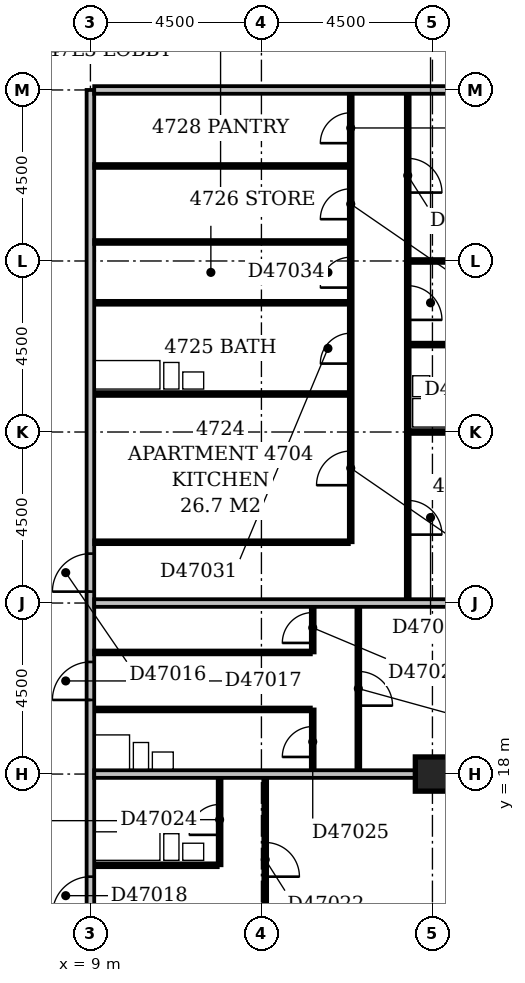
"""IFC4 building model, lengths in metres.
Left out: names, types, materials, properties, quantities, classifications, styles, units other than length and angle.
Written with IfcOpenShell. Run it as: python <this file> out.ifc"""

import sys

from ifc_helpers import new_model, si_unit, direction, frame, frame_2d, origin, origin_2d, place, context, subcontext, project, spatial, rectangle, extrude, element, fill, save


model = new_model("IFC4")
c1 = context("Model", 3, precision=1e-05, world=origin(), true_north=direction((0.0, 1.0)))
c2 = subcontext(c1, "Body", "Model", "MODEL_VIEW")
j1 = project(units=[si_unit("LENGTHUNIT", "METRE"), si_unit("PLANEANGLEUNIT", "RADIAN")], contexts=[c1])
p1 = place(None, origin())
s1 = spatial("IfcSite", under=j1, at=p1, CompositionType="ELEMENT")
p2 = place(p1, origin())
s2 = spatial("IfcBuilding", under=s1, at=p2, CompositionType="ELEMENT")
p3 = place(p2, frame((0.0, 0.0, 186.2)))
s3 = spatial("IfcBuildingStorey", under=s2, at=p3, CompositionType="ELEMENT", Elevation=186.2)
p4 = place(p3, frame((18.0, 18.0, -0.35), z_axis=(0.0, 0.0, 1.0), x_axis=(1.0, 0.0, 0.0)))
e1 = element("IfcColumn", 1, at=p4, inside=s3, PredefinedType="COLUMN", context=c2, shape_type="SweptSolid", body=[
    extrude(rectangle(XDim=0.9, YDim=0.9, at=origin_2d()), origin(), (0.0, 0.0, 1.0), 3.65),
])
p5 = place(p3, frame((9.0, 5.0, 0.0), z_axis=(0.0, 0.0, 1.0), x_axis=(0.0, 1.0, 0.0)))
e2 = element("IfcWall", 2, at=p5, inside=s3, PredefinedType="PARTITIONING", context=c2, shape_type="SweptSolid", body=[
    extrude(rectangle(XDim=31.0, YDim=0.2, at=frame_2d((15.5, 0.0))), origin(), (0.0, 0.0, 1.0), 3.3),
])
p6 = place(p5, frame((17.8, 0.0, 0.0)))
e3 = element("IfcOpeningElement", 3, at=p6, cuts=e2, PredefinedType="OPENING", context=c2, shape_type="SweptSolid", body=[
    extrude(rectangle(XDim=1.0, YDim=2.1, at=frame_2d((0.5, 1.05))), frame((0.0, 0.112, 0.0), z_axis=(0.0, -1.0, 0.0), x_axis=(1.0, 0.0, 0.0)), (0.0, 0.0, 1.0), 0.224),
])
p7 = place(p5, frame((14.95, 0.0, 0.0)))
e4 = element("IfcOpeningElement", 4, at=p7, cuts=e2, PredefinedType="OPENING", context=c2, shape_type="SweptSolid", body=[
    extrude(rectangle(XDim=1.0, YDim=2.1, at=frame_2d((0.5, 1.05))), frame((0.0, 0.112, 0.0), z_axis=(0.0, -1.0, 0.0), x_axis=(1.0, 0.0, 0.0)), (0.0, 0.0, 1.0), 0.224),
])
p8 = place(p5, frame((9.3, 0.0, 0.0)))
e5 = element("IfcOpeningElement", 5, at=p8, cuts=e2, PredefinedType="OPENING", context=c2, shape_type="SweptSolid", body=[
    extrude(rectangle(XDim=1.0, YDim=2.1, at=frame_2d((0.5, 1.05))), frame((0.0, 0.112, 0.0), z_axis=(0.0, -1.0, 0.0), x_axis=(1.0, 0.0, 0.0)), (0.0, 0.0, 1.0), 0.224),
])
p9 = place(p5, frame((1.5, 0.0, 0.0)))
e6 = element("IfcOpeningElement", 6, at=p9, cuts=e2, PredefinedType="OPENING", context=c2, shape_type="SweptSolid", body=[
    extrude(rectangle(XDim=0.9, YDim=2.1, at=frame_2d((0.45, 1.05))), frame((0.0, 0.112, 0.0), z_axis=(0.0, -1.0, 0.0), x_axis=(1.0, 0.0, 0.0)), (0.0, 0.0, 1.0), 0.224),
])
p10 = place(p3, frame((13.6, 9.45, 0.0), z_axis=(0.0, 0.0, 1.0), x_axis=(0.0, 1.0, 0.0)))
e7 = element("IfcWall", 7, at=p10, inside=s3, PredefinedType="PARTITIONING", context=c2, shape_type="SweptSolid", body=[
    extrude(rectangle(XDim=8.45, YDim=0.1, at=frame_2d((4.225, 0.0))), origin(), (0.0, 0.0, 1.0), 3.3),
])
p11 = place(p10, frame((1.35, 0.0, 0.0)))
e8 = element("IfcOpeningElement", 8, at=p11, cuts=e7, PredefinedType="OPENING", context=c2, shape_type="SweptSolid", body=[
    extrude(rectangle(XDim=0.9, YDim=2.1, at=frame_2d((0.45, 1.05))), frame((0.0, 0.062, 0.0), z_axis=(0.0, -1.0, 0.0), x_axis=(1.0, 0.0, 0.0)), (0.0, 0.0, 1.0), 0.124),
])
p12 = place(p10, frame((5.85, 0.0, 0.0)))
e9 = element("IfcOpeningElement", 9, at=p12, cuts=e7, PredefinedType="OPENING", context=c2, shape_type="SweptSolid", body=[
    extrude(rectangle(XDim=0.9, YDim=2.1, at=frame_2d((0.45, 1.05))), frame((0.0, 0.062, 0.0), z_axis=(0.0, -1.0, 0.0), x_axis=(1.0, 0.0, 0.0)), (0.0, 0.0, 1.0), 0.124),
])
p13 = place(p3, frame((9.1, 15.6, 0.0), z_axis=(0.0, 0.0, 1.0), x_axis=(1.0, 0.0, 0.0)))
e10 = element("IfcWall", 10, at=p13, inside=s3, PredefinedType="PLUMBINGWALL", context=c2, shape_type="SweptSolid", body=[
    extrude(rectangle(XDim=3.25, YDim=0.1, at=frame_2d((1.625, 0.0))), origin(), (0.0, 0.0, 1.0), 3.3),
])
p14 = place(p3, frame((12.4, 15.6, 0.0), z_axis=(0.0, 0.0, 1.0), x_axis=(0.0, 1.0, 0.0)))
e11 = element("IfcWall", 11, at=p14, inside=s3, PredefinedType="PARTITIONING", context=c2, shape_type="SweptSolid", body=[
    extrude(rectangle(XDim=2.3, YDim=0.1, at=frame_2d((1.15, 0.0))), origin(), (0.0, 0.0, 1.0), 3.3),
])
p15 = place(p14, frame((0.8, 0.0, 0.0)))
e12 = element("IfcOpeningElement", 12, at=p15, cuts=e11, PredefinedType="OPENING", context=c2, shape_type="SweptSolid", body=[
    extrude(rectangle(XDim=0.8, YDim=2.1, at=frame_2d((0.4, 1.05))), frame((0.0, 0.062, 0.0), z_axis=(0.0, -1.0, 0.0), x_axis=(1.0, 0.0, 0.0)), (0.0, 0.0, 1.0), 0.124),
])
p16 = place(p3, frame((9.1, 18.0, 0.0), z_axis=(0.0, 0.0, 1.0), x_axis=(1.0, 0.0, 0.0)))
e13 = element("IfcWall", 13, at=p16, inside=s3, PredefinedType="PARTITIONING", context=c2, shape_type="SweptSolid", body=[
    extrude(rectangle(XDim=8.45, YDim=0.2, at=frame_2d((4.225, 0.0))), origin(), (0.0, 0.0, 1.0), 2.6),
])
p17 = place(p3, frame((14.85, 18.1, 0.0), z_axis=(0.0, 0.0, 1.0), x_axis=(0.0, 1.0, 0.0)))
e14 = element("IfcWall", 14, at=p17, inside=s3, PredefinedType="PARTITIONING", context=c2, shape_type="SweptSolid", body=[
    extrude(rectangle(XDim=1.6, YDim=0.1, at=frame_2d((0.8, 0.0))), origin(), (0.0, 0.0, 1.0), 3.3),
])
p18 = place(p17, frame((0.35, 0.0, 0.0)))
e15 = element("IfcOpeningElement", 15, at=p18, cuts=e14, PredefinedType="OPENING", context=c2, shape_type="SweptSolid", body=[
    extrude(rectangle(XDim=0.8, YDim=2.1, at=frame_2d((0.4, 1.05))), frame((0.0, 0.062, 0.0), z_axis=(0.0, -1.0, 0.0), x_axis=(1.0, 0.0, 0.0)), (0.0, 0.0, 1.0), 0.124),
])
p19 = place(p3, frame((16.05, 18.1, 0.0), z_axis=(0.0, 0.0, 1.0), x_axis=(0.0, 1.0, 0.0)))
e16 = element("IfcWall", 16, at=p19, inside=s3, PredefinedType="PARTITIONING", context=c2, shape_type="SweptSolid", body=[
    extrude(rectangle(XDim=4.3, YDim=0.1, at=frame_2d((2.15, 0.0))), origin(), (0.0, 0.0, 1.0), 3.3),
])
p20 = place(p19, frame((1.7, 0.0, 0.0)))
e17 = element("IfcOpeningElement", 17, at=p20, cuts=e16, PredefinedType="OPENING", context=c2, shape_type="SweptSolid", body=[
    extrude(rectangle(XDim=0.9, YDim=2.1, at=frame_2d((0.45, 1.05))), frame((0.0, 0.062, 0.0), z_axis=(0.0, -1.0, 0.0), x_axis=(1.0, 0.0, 0.0)), (0.0, 0.0, 1.0), 0.124),
])
p21 = place(p3, frame((9.1, 19.7, 0.0), z_axis=(0.0, 0.0, 1.0), x_axis=(1.0, 0.0, 0.0)))
e18 = element("IfcWall", 18, at=p21, inside=s3, PredefinedType="PLUMBINGWALL", context=c2, shape_type="SweptSolid", body=[
    extrude(rectangle(XDim=5.7, YDim=0.1, at=frame_2d((2.85, 0.0))), origin(), (0.0, 0.0, 1.0), 3.3),
])
p22 = place(p3, frame((9.1, 21.2, 0.0), z_axis=(0.0, 0.0, 1.0), x_axis=(1.0, 0.0, 0.0)))
e19 = element("IfcWall", 19, at=p22, inside=s3, PredefinedType="PARTITIONING", context=c2, shape_type="SweptSolid", body=[
    extrude(rectangle(XDim=5.7, YDim=0.1, at=frame_2d((2.85, 0.0))), origin(), (0.0, 0.0, 1.0), 3.3),
])
p23 = place(p3, frame((14.85, 21.2, 0.0), z_axis=(0.0, 0.0, 1.0), x_axis=(0.0, 1.0, 0.0)))
e20 = element("IfcWall", 20, at=p23, inside=s3, PredefinedType="PARTITIONING", context=c2, shape_type="SweptSolid", body=[
    extrude(rectangle(XDim=1.2, YDim=0.1, at=frame_2d((0.6, 0.0))), origin(), (0.0, 0.0, 1.0), 3.3),
])
p24 = place(p23, frame((0.25, 0.0, 0.0)))
e21 = element("IfcOpeningElement", 21, at=p24, cuts=e20, PredefinedType="OPENING", context=c2, shape_type="SweptSolid", body=[
    extrude(rectangle(XDim=0.8, YDim=2.1, at=frame_2d((0.4, 1.05))), frame((0.0, 0.062, 0.0), z_axis=(0.0, -1.0, 0.0), x_axis=(1.0, 0.0, 0.0)), (0.0, 0.0, 1.0), 0.124),
])
p25 = place(p3, frame((9.1, 22.5, 0.0), z_axis=(0.0, 0.0, 1.0), x_axis=(1.0, 0.0, 0.0)))
e22 = element("IfcWall", 22, at=p25, inside=s3, PredefinedType="PARTITIONING", context=c2, shape_type="SweptSolid", body=[
    extrude(rectangle(XDim=12.95, YDim=0.2, at=frame_2d((6.475, 0.0))), origin(), (0.0, 0.0, 1.0), 3.3),
])
p26 = place(p3, frame((17.35, 22.6, 0.0), z_axis=(0.0, 0.0, 1.0), x_axis=(0.0, 1.0, 0.0)))
e23 = element("IfcWall", 23, at=p26, inside=s3, PredefinedType="PARTITIONING", context=c2, shape_type="SweptSolid", body=[
    extrude(rectangle(XDim=13.3, YDim=0.1, at=frame_2d((6.65, 0.0))), origin(), (0.0, 0.0, 1.0), 3.3),
])
p27 = place(p26, frame((1.7, 0.0, 0.0)))
e24 = element("IfcOpeningElement", 24, at=p27, cuts=e23, PredefinedType="OPENING", context=c2, shape_type="SweptSolid", body=[
    extrude(rectangle(XDim=0.9, YDim=2.1, at=frame_2d((0.45, 1.05))), frame((0.0, 0.062, 0.0), z_axis=(0.0, -1.0, 0.0), x_axis=(1.0, 0.0, 0.0)), (0.0, 0.0, 1.0), 0.124),
])
p28 = place(p26, frame((7.35, 0.0, 0.0)))
e25 = element("IfcOpeningElement", 25, at=p28, cuts=e23, PredefinedType="OPENING", context=c2, shape_type="SweptSolid", body=[
    extrude(rectangle(XDim=0.9, YDim=2.1, at=frame_2d((0.45, 1.05))), frame((0.0, 0.062, 0.0), z_axis=(0.0, -1.0, 0.0), x_axis=(1.0, 0.0, 0.0)), (0.0, 0.0, 1.0), 0.124),
])
p29 = place(p26, frame((10.7, 0.0, 0.0)))
e26 = element("IfcOpeningElement", 26, at=p29, cuts=e23, PredefinedType="OPENING", context=c2, shape_type="SweptSolid", body=[
    extrude(rectangle(XDim=0.9, YDim=2.1, at=frame_2d((0.45, 1.05))), frame((0.0, 0.062, 0.0), z_axis=(0.0, -1.0, 0.0), x_axis=(1.0, 0.0, 0.0)), (0.0, 0.0, 1.0), 0.124),
])
p30 = place(p3, frame((9.1, 24.1, 0.0), z_axis=(0.0, 0.0, 1.0), x_axis=(1.0, 0.0, 0.0)))
e27 = element("IfcWall", 27, at=p30, inside=s3, PredefinedType="PARTITIONING", context=c2, shape_type="SweptSolid", body=[
    extrude(rectangle(XDim=6.7, YDim=0.1, at=frame_2d((3.35, 0.0))), origin(), (0.0, 0.0, 1.0), 3.3),
])
p31 = place(p3, frame((15.85, 24.1, 0.0), z_axis=(0.0, 0.0, 1.0), x_axis=(0.0, 1.0, 0.0)))
e28 = element("IfcWall", 28, at=p31, inside=s3, PredefinedType="PARTITIONING", context=c2, shape_type="SweptSolid", body=[
    extrude(rectangle(XDim=11.8, YDim=0.1, at=frame_2d((5.9, 0.0))), origin(), (0.0, 0.0, 1.0), 3.3),
])
p32 = place(p31, frame((4.7, 0.0, 0.0)))
e29 = element("IfcOpeningElement", 29, at=p32, cuts=e28, PredefinedType="OPENING", context=c2, shape_type="SweptSolid", body=[
    extrude(rectangle(XDim=0.8, YDim=2.1, at=frame_2d((0.4, 1.05))), frame((0.0, 0.062, 0.0), z_axis=(0.0, -1.0, 0.0), x_axis=(1.0, 0.0, 0.0)), (0.0, 0.0, 1.0), 0.124),
])
p33 = place(p31, frame((1.5, 0.0, 0.0)))
e30 = element("IfcOpeningElement", 30, at=p33, cuts=e28, PredefinedType="OPENING", context=c2, shape_type="SweptSolid", body=[
    extrude(rectangle(XDim=0.9, YDim=2.1, at=frame_2d((0.45, 1.05))), frame((0.0, 0.062, 0.0), z_axis=(0.0, -1.0, 0.0), x_axis=(1.0, 0.0, 0.0)), (0.0, 0.0, 1.0), 0.124),
])
p34 = place(p31, frame((10.5, 0.0, 0.0)))
e31 = element("IfcOpeningElement", 31, at=p34, cuts=e28, PredefinedType="OPENING", context=c2, shape_type="SweptSolid", body=[
    extrude(rectangle(XDim=0.8, YDim=2.1, at=frame_2d((0.4, 1.05))), frame((0.0, 0.062, 0.0), z_axis=(0.0, -1.0, 0.0), x_axis=(1.0, 0.0, 0.0)), (0.0, 0.0, 1.0), 0.124),
])
p35 = place(p31, frame((6.7, 0.0, 0.0)))
e32 = element("IfcOpeningElement", 32, at=p35, cuts=e28, PredefinedType="OPENING", context=c2, shape_type="SweptSolid", body=[
    extrude(rectangle(XDim=0.8, YDim=2.1, at=frame_2d((0.4, 1.05))), frame((0.0, 0.062, 0.0), z_axis=(0.0, -1.0, 0.0), x_axis=(1.0, 0.0, 0.0)), (0.0, 0.0, 1.0), 0.124),
])
p36 = place(p31, frame((8.5, 0.0, 0.0)))
e33 = element("IfcOpeningElement", 33, at=p36, cuts=e28, PredefinedType="OPENING", context=c2, shape_type="SweptSolid", body=[
    extrude(rectangle(XDim=0.8, YDim=2.1, at=frame_2d((0.4, 1.05))), frame((0.0, 0.062, 0.0), z_axis=(0.0, -1.0, 0.0), x_axis=(1.0, 0.0, 0.0)), (0.0, 0.0, 1.0), 0.124),
])
p37 = place(p3, frame((17.4, 27.0, 0.0), z_axis=(0.0, 0.0, 1.0), x_axis=(1.0, 0.0, 0.0)))
e34 = element("IfcWall", 34, at=p37, inside=s3, PredefinedType="PARTITIONING", context=c2, shape_type="SweptSolid", body=[
    extrude(rectangle(XDim=4.65, YDim=0.1, at=frame_2d((2.325, 0.0))), origin(), (0.0, 0.0, 1.0), 2.7),
])
p38 = place(p3, frame((9.1, 28.0, 0.0), z_axis=(0.0, 0.0, 1.0), x_axis=(1.0, 0.0, 0.0)))
e35 = element("IfcWall", 35, at=p38, inside=s3, PredefinedType="PLUMBINGWALL", context=c2, shape_type="SweptSolid", body=[
    extrude(rectangle(XDim=6.7, YDim=0.1, at=frame_2d((3.35, 0.0))), origin(), (0.0, 0.0, 1.0), 3.3),
])
p39 = place(p3, frame((17.4, 29.3, 0.0), z_axis=(0.0, 0.0, 1.0), x_axis=(1.0, 0.0, 0.0)))
e36 = element("IfcWall", 36, at=p39, inside=s3, PredefinedType="PLUMBINGWALL", context=c2, shape_type="SweptSolid", body=[
    extrude(rectangle(XDim=2.8, YDim=0.1, at=frame_2d((1.4, 0.0))), origin(), (0.0, 0.0, 1.0), 3.3),
])
p40 = place(p39, frame((1.0, 0.0, 0.0)))
e37 = element("IfcOpeningElement", 37, at=p40, cuts=e36, PredefinedType="OPENING", context=c2, shape_type="SweptSolid", body=[
    extrude(rectangle(XDim=0.8, YDim=2.1, at=frame_2d((0.4, 1.05))), frame((0.0, 0.062, 0.0), z_axis=(0.0, -1.0, 0.0), x_axis=(1.0, 0.0, 0.0)), (0.0, 0.0, 1.0), 0.124),
])
p41 = place(p3, frame((9.1, 30.4, 0.0), z_axis=(0.0, 0.0, 1.0), x_axis=(1.0, 0.0, 0.0)))
e38 = element("IfcWall", 38, at=p41, inside=s3, PredefinedType="PLUMBINGWALL", context=c2, shape_type="SweptSolid", body=[
    extrude(rectangle(XDim=6.7, YDim=0.1, at=frame_2d((3.35, 0.0))), origin(), (0.0, 0.0, 1.0), 3.3),
])
p42 = place(p3, frame((17.4, 31.5, 0.0), z_axis=(0.0, 0.0, 1.0), x_axis=(1.0, 0.0, 0.0)))
e39 = element("IfcWall", 39, at=p42, inside=s3, PredefinedType="PARTITIONING", context=c2, shape_type="SweptSolid", body=[
    extrude(rectangle(XDim=4.65, YDim=0.1, at=frame_2d((2.325, 0.0))), origin(), (0.0, 0.0, 1.0), 3.3),
])
for number, where, z_axis, x_axis in (
    (40, (9.1, 32.0, 0.0), (0.0, 0.0, 1.0), (1.0, 0.0, 0.0)),
    (41, (9.1, 34.0, 0.0), (0.0, 0.0, 1.0), (1.0, 0.0, 0.0)),
):
    element("IfcWall", number, at=place(p3, frame(where, z_axis=z_axis, x_axis=x_axis)), inside=s3, PredefinedType="PARTITIONING", context=c2, shape_type="SweptSolid", body=[
        extrude(rectangle(XDim=6.7, YDim=0.1, at=frame_2d((3.35, 0.0))), origin(), (0.0, 0.0, 1.0), 3.3),
    ])
p43 = place(p3, frame((9.1, 36.0, 0.0), z_axis=(0.0, 0.0, 1.0), x_axis=(1.0, 0.0, 0.0)))
e42 = element("IfcWall", 42, at=p43, inside=s3, PredefinedType="PARTITIONING", context=c2, shape_type="SweptSolid", body=[
    extrude(rectangle(XDim=12.95, YDim=0.2, at=frame_2d((6.475, 0.0))), origin(), (0.0, 0.0, 1.0), 3.3),
])
p44 = place(p6, origin())
e43 = element("IfcDoor", 43, at=p44, inside=s3, OperationType="SINGLE_SWING_LEFT", PredefinedType="DOOR", context=c2, shape_type="SweptSolid", body=[
    extrude(rectangle(XDim=1.0, YDim=2.1, at=frame_2d((0.5, 1.05))), frame((0.0, 0.025, 0.0), z_axis=(0.0, -1.0, 0.0), x_axis=(1.0, 0.0, 0.0)), (0.0, 0.0, 1.0), 0.05),
])
fill(e3, e43)
p45 = place(p7, origin())
e44 = element("IfcDoor", 44, at=p45, inside=s3, OperationType="SINGLE_SWING_LEFT", PredefinedType="DOOR", context=c2, shape_type="SweptSolid", body=[
    extrude(rectangle(XDim=1.0, YDim=2.1, at=frame_2d((0.5, 1.05))), frame((0.0, 0.025, 0.0), z_axis=(0.0, -1.0, 0.0), x_axis=(1.0, 0.0, 0.0)), (0.0, 0.0, 1.0), 0.05),
])
fill(e4, e44)
p46 = place(p8, origin())
e45 = element("IfcDoor", 45, at=p46, inside=s3, OperationType="SINGLE_SWING_LEFT", PredefinedType="DOOR", context=c2, shape_type="SweptSolid", body=[
    extrude(rectangle(XDim=1.0, YDim=2.1, at=frame_2d((0.5, 1.05))), frame((0.0, 0.025, 0.0), z_axis=(0.0, -1.0, 0.0), x_axis=(1.0, 0.0, 0.0)), (0.0, 0.0, 1.0), 0.05),
])
fill(e5, e45)
p47 = place(p12, frame((0.9, 0.0, 0.0), z_axis=(0.0, 0.0, 1.0), x_axis=(-1.0, 0.0, 0.0)))
e46 = element("IfcDoor", 46, at=p47, inside=s3, OperationType="SINGLE_SWING_RIGHT", PredefinedType="DOOR", context=c2, shape_type="SweptSolid", body=[
    extrude(rectangle(XDim=0.9, YDim=2.1, at=frame_2d((0.45, 1.05))), frame((0.0, 0.025, 0.0), z_axis=(0.0, -1.0, 0.0), x_axis=(1.0, 0.0, 0.0)), (0.0, 0.0, 1.0), 0.05),
])
fill(e9, e46)
p48 = place(p15, origin())
e47 = element("IfcDoor", 47, at=p48, inside=s3, OperationType="SINGLE_SWING_LEFT", PredefinedType="DOOR", context=c2, shape_type="SweptSolid", body=[
    extrude(rectangle(XDim=0.8, YDim=2.1, at=frame_2d((0.4, 1.05))), frame((0.0, 0.025, 0.0), z_axis=(0.0, -1.0, 0.0), x_axis=(1.0, 0.0, 0.0)), (0.0, 0.0, 1.0), 0.05),
])
fill(e12, e47)
p49 = place(p18, origin())
e48 = element("IfcDoor", 48, at=p49, inside=s3, OperationType="SINGLE_SWING_LEFT", PredefinedType="DOOR", context=c2, shape_type="SweptSolid", body=[
    extrude(rectangle(XDim=0.8, YDim=2.1, at=frame_2d((0.4, 1.05))), frame((0.0, 0.025, 0.0), z_axis=(0.0, -1.0, 0.0), x_axis=(1.0, 0.0, 0.0)), (0.0, 0.0, 1.0), 0.05),
])
fill(e15, e48)
p50 = place(p20, frame((0.9, 0.0, 0.0), z_axis=(0.0, 0.0, 1.0), x_axis=(-1.0, 0.0, 0.0)))
e49 = element("IfcDoor", 49, at=p50, inside=s3, OperationType="SINGLE_SWING_RIGHT", PredefinedType="DOOR", context=c2, shape_type="SweptSolid", body=[
    extrude(rectangle(XDim=0.9, YDim=2.1, at=frame_2d((0.45, 1.05))), frame((0.0, 0.025, 0.0), z_axis=(0.0, -1.0, 0.0), x_axis=(1.0, 0.0, 0.0)), (0.0, 0.0, 1.0), 0.05),
])
fill(e17, e49)
p51 = place(p24, origin())
e50 = element("IfcDoor", 50, at=p51, inside=s3, OperationType="SINGLE_SWING_LEFT", PredefinedType="DOOR", context=c2, shape_type="SweptSolid", body=[
    extrude(rectangle(XDim=0.8, YDim=2.1, at=frame_2d((0.4, 1.05))), frame((0.0, 0.025, 0.0), z_axis=(0.0, -1.0, 0.0), x_axis=(1.0, 0.0, 0.0)), (0.0, 0.0, 1.0), 0.05),
])
fill(e21, e50)
p52 = place(p27, frame((0.9, 0.0, 0.0), z_axis=(0.0, 0.0, 1.0), x_axis=(-1.0, 0.0, 0.0)))
e51 = element("IfcDoor", 51, at=p52, inside=s3, OperationType="SINGLE_SWING_RIGHT", PredefinedType="DOOR", context=c2, shape_type="SweptSolid", body=[
    extrude(rectangle(XDim=0.9, YDim=2.1, at=frame_2d((0.45, 1.05))), frame((0.0, 0.025, 0.0), z_axis=(0.0, -1.0, 0.0), x_axis=(1.0, 0.0, 0.0)), (0.0, 0.0, 1.0), 0.05),
])
fill(e24, e51)
p53 = place(p28, frame((0.9, 0.0, 0.0), z_axis=(0.0, 0.0, 1.0), x_axis=(-1.0, 0.0, 0.0)))
e52 = element("IfcDoor", 52, at=p53, inside=s3, OperationType="SINGLE_SWING_RIGHT", PredefinedType="DOOR", context=c2, shape_type="SweptSolid", body=[
    extrude(rectangle(XDim=0.9, YDim=2.1, at=frame_2d((0.45, 1.05))), frame((0.0, 0.025, 0.0), z_axis=(0.0, -1.0, 0.0), x_axis=(1.0, 0.0, 0.0)), (0.0, 0.0, 1.0), 0.05),
])
fill(e25, e52)
p54 = place(p29, frame((0.9, 0.0, 0.0), z_axis=(0.0, 0.0, 1.0), x_axis=(-1.0, 0.0, 0.0)))
e53 = element("IfcDoor", 53, at=p54, inside=s3, OperationType="SINGLE_SWING_RIGHT", PredefinedType="DOOR", context=c2, shape_type="SweptSolid", body=[
    extrude(rectangle(XDim=0.9, YDim=2.1, at=frame_2d((0.45, 1.05))), frame((0.0, 0.025, 0.0), z_axis=(0.0, -1.0, 0.0), x_axis=(1.0, 0.0, 0.0)), (0.0, 0.0, 1.0), 0.05),
])
fill(e26, e53)
p55 = place(p32, origin())
e54 = element("IfcDoor", 54, at=p55, inside=s3, OperationType="SINGLE_SWING_LEFT", PredefinedType="DOOR", context=c2, shape_type="SweptSolid", body=[
    extrude(rectangle(XDim=0.8, YDim=2.1, at=frame_2d((0.4, 1.05))), frame((0.0, 0.025, 0.0), z_axis=(0.0, -1.0, 0.0), x_axis=(1.0, 0.0, 0.0)), (0.0, 0.0, 1.0), 0.05),
])
fill(e29, e54)
p56 = place(p33, origin())
e55 = element("IfcDoor", 55, at=p56, inside=s3, OperationType="SINGLE_SWING_LEFT", PredefinedType="DOOR", context=c2, shape_type="SweptSolid", body=[
    extrude(rectangle(XDim=0.9, YDim=2.1, at=frame_2d((0.45, 1.05))), frame((0.0, 0.025, 0.0), z_axis=(0.0, -1.0, 0.0), x_axis=(1.0, 0.0, 0.0)), (0.0, 0.0, 1.0), 0.05),
])
fill(e30, e55)
p57 = place(p34, origin())
e56 = element("IfcDoor", 56, at=p57, inside=s3, OperationType="SINGLE_SWING_LEFT", PredefinedType="DOOR", context=c2, shape_type="SweptSolid", body=[
    extrude(rectangle(XDim=0.8, YDim=2.1, at=frame_2d((0.4, 1.05))), frame((0.0, 0.025, 0.0), z_axis=(0.0, -1.0, 0.0), x_axis=(1.0, 0.0, 0.0)), (0.0, 0.0, 1.0), 0.05),
])
fill(e31, e56)
p58 = place(p35, origin())
e57 = element("IfcDoor", 57, at=p58, inside=s3, OperationType="SINGLE_SWING_LEFT", PredefinedType="DOOR", context=c2, shape_type="SweptSolid", body=[
    extrude(rectangle(XDim=0.8, YDim=2.1, at=frame_2d((0.4, 1.05))), frame((0.0, 0.025, 0.0), z_axis=(0.0, -1.0, 0.0), x_axis=(1.0, 0.0, 0.0)), (0.0, 0.0, 1.0), 0.05),
])
fill(e32, e57)
p59 = place(p36, origin())
e58 = element("IfcDoor", 58, at=p59, inside=s3, OperationType="SINGLE_SWING_LEFT", PredefinedType="DOOR", context=c2, shape_type="SweptSolid", body=[
    extrude(rectangle(XDim=0.8, YDim=2.1, at=frame_2d((0.4, 1.05))), frame((0.0, 0.025, 0.0), z_axis=(0.0, -1.0, 0.0), x_axis=(1.0, 0.0, 0.0)), (0.0, 0.0, 1.0), 0.05),
])
fill(e33, e58)
save(model, sys.argv[1])
